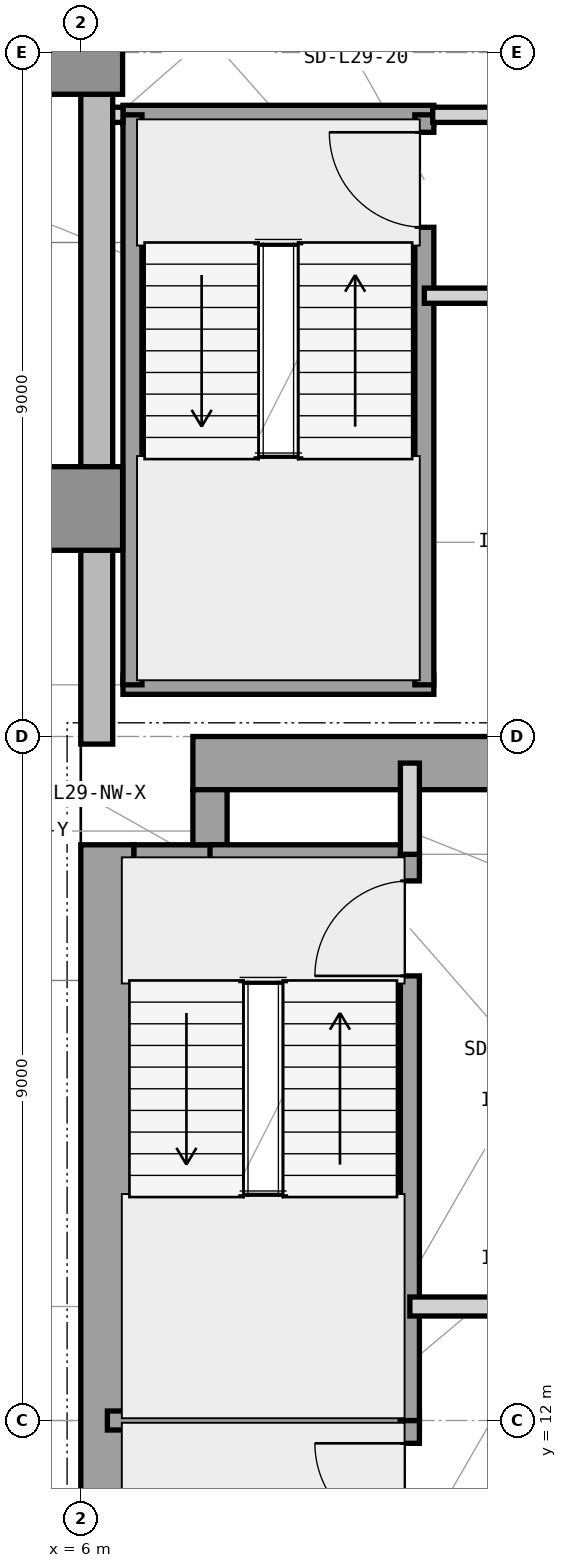
"""IFC4 building model, lengths in metres.
Left out: names, types, materials, properties, quantities, classifications, styles, units other than length and angle.
Written with IfcOpenShell. Run it as: python <this file> out.ifc"""

import sys

from ifc_helpers import new_model, si_unit, direction, frame, frame_2d, origin, origin_2d, place, context, subcontext, project, spatial, rectangle, extrude, element, fill, save


model = new_model("IFC4")
c1 = context("Model", 3, precision=1e-05, world=origin(), true_north=direction((0.0, 1.0)))
c2 = subcontext(c1, "Body", "Model", "MODEL_VIEW")
j1 = project(units=[si_unit("LENGTHUNIT", "METRE"), si_unit("PLANEANGLEUNIT", "RADIAN")], contexts=[c1])
p1 = place(None, origin())
s1 = spatial("IfcSite", under=j1, at=p1, CompositionType="ELEMENT")
p2 = place(p1, origin())
s2 = spatial("IfcBuilding", under=s1, at=p2, CompositionType="ELEMENT")
p3 = place(p2, frame((0.0, 0.0, 124.5)))
s3 = spatial("IfcBuildingStorey", under=s2, at=p3, CompositionType="ELEMENT", Elevation=124.5)
p4 = place(p3, frame((6.35, 4.425, 0.0), z_axis=(0.0, 0.0, 1.0), x_axis=(0.0, 1.0, 0.0)))
e1 = element("IfcWall", 1, at=p4, inside=s3, PredefinedType="SHEAR", context=c2, shape_type="SweptSolid", body=[
    extrude(rectangle(XDim=15.15, YDim=0.7, at=frame_2d((7.575, 0.0))), origin(), (0.0, 0.0, 1.0), 3.9),
])
p5 = place(p3, frame((7.475, 20.65, 0.0), z_axis=(0.0, 0.0, 1.0), x_axis=(1.0, 0.0, 0.0)))
e2 = element("IfcWall", 2, at=p5, inside=s3, PredefinedType="SHEAR", context=c2, shape_type="SweptSolid", body=[
    extrude(rectangle(XDim=12.325, YDim=0.7, at=frame_2d((6.163, 0.0))), origin(), (0.0, 0.0, 1.0), 3.9),
])
p6 = place(p3, frame((6.7, 19.35, 0.0), z_axis=(0.0, 0.0, 1.0), x_axis=(1.0, 0.0, 0.0)))
e3 = element("IfcWall", 3, at=p6, inside=s3, PredefinedType="SHEAR", context=c2, shape_type="SweptSolid", body=[
    extrude(rectangle(XDim=1.225, YDim=0.45, at=frame_2d((0.613, 0.0))), origin(), (0.0, 0.0, 1.0), 3.9),
])
p7 = place(p3, frame((7.7, 19.575, 0.0), z_axis=(0.0, 0.0, 1.0), x_axis=(0.0, 1.0, 0.0)))
e4 = element("IfcWall", 4, at=p7, inside=s3, PredefinedType="SHEAR", context=c2, shape_type="SweptSolid", body=[
    extrude(rectangle(XDim=0.725, YDim=0.45, at=frame_2d((0.363, 0.0))), origin(), (0.0, 0.0, 1.0), 3.9),
])
for number, where, z_axis, x_axis in (
    (5, (6.0, 24.0, 0.0), (0.0, 0.0, 1.0), (1.0, 0.0, 0.0)),
    (6, (6.0, 30.0, 0.0), (0.0, 0.0, 1.0), (1.0, 0.0, 0.0)),
):
    element("IfcColumn", number, at=place(p3, frame(where, z_axis=z_axis, x_axis=x_axis)), inside=s3, PredefinedType="COLUMN", context=c2, shape_type="SweptSolid", body=[
        extrude(rectangle(XDim=1.1, YDim=1.1, at=origin_2d()), origin(), (0.0, 0.0, 1.0), 3.9),
    ])
p8 = place(p3, frame((6.21, 46.4, 0.0), z_axis=(0.0, 0.0, 1.0), x_axis=(0.0, -1.0, 0.0)))
e7 = element("IfcWall", 7, at=p8, inside=s3, PredefinedType="STANDARD", context=c2, shape_type="SweptSolid", body=[
    extrude(rectangle(XDim=25.5, YDim=0.42, at=frame_2d((12.75, 0.0))), origin(), (0.0, 0.0, 1.0), 3.7),
])
p9 = place(p8, frame((11.5, 0.0, 0.85)))
e8 = element("IfcOpeningElement", 8, at=p9, cuts=e7, PredefinedType="OPENING", context=c2, shape_type="SweptSolid", body=[
    extrude(rectangle(XDim=2.5, YDim=2.25, at=frame_2d((1.25, 1.125))), frame((0.0, 0.22, 0.0), z_axis=(0.0, -1.0, 0.0), x_axis=(1.0, 0.0, 0.0)), (0.0, 0.0, 1.0), 0.44),
])
p10 = place(p8, frame((8.286, 0.0, 0.85)))
e9 = element("IfcOpeningElement", 9, at=p10, cuts=e7, PredefinedType="OPENING", context=c2, shape_type="SweptSolid", body=[
    extrude(rectangle(XDim=1.2, YDim=2.25, at=frame_2d((0.6, 1.125))), frame((0.0, 0.22, 0.0), z_axis=(0.0, -1.0, 0.0), x_axis=(1.0, 0.0, 0.0)), (0.0, 0.0, 1.0), 0.44),
])
p11 = place(p3, frame((6.35, 12.0, 0.0), z_axis=(0.0, 0.0, 1.0), x_axis=(1.0, 0.0, 0.0)))
e10 = element("IfcWall", 10, at=p11, inside=s3, PredefinedType="SHEAR", context=c2, shape_type="SweptSolid", body=[
    extrude(rectangle(XDim=4.105, YDim=0.25, at=frame_2d((2.052, 0.0))), origin(), (0.0, 0.0, 1.0), 3.9),
])
p12 = place(p3, frame((7.7, 19.45, 0.0), z_axis=(0.0, 0.0, 1.0), x_axis=(1.0, 0.0, 0.0)))
e11 = element("IfcWall", 11, at=p12, inside=s3, PredefinedType="SHEAR", context=c2, shape_type="SweptSolid", body=[
    extrude(rectangle(XDim=2.755, YDim=0.25, at=frame_2d((1.377, 0.0))), origin(), (0.0, 0.0, 1.0), 3.9),
])
p13 = place(p3, frame((10.33, 4.55, 0.0), z_axis=(0.0, 0.0, 1.0), x_axis=(0.0, 1.0, 0.0)))
e12 = element("IfcWall", 12, at=p13, inside=s3, PredefinedType="SHEAR", context=c2, shape_type="SweptSolid", body=[
    extrude(rectangle(XDim=7.45, YDim=0.25, at=frame_2d((3.725, 0.0))), origin(), (0.0, 0.0, 1.0), 3.9),
])
p14 = place(p13, frame((5.9, 0.0, 0.0)))
e13 = element("IfcOpeningElement", 13, at=p14, cuts=e12, PredefinedType="OPENING", context=c2, shape_type="SweptSolid", body=[
    extrude(rectangle(XDim=1.25, YDim=2.2, at=frame_2d((0.625, 1.1))), frame((0.0, 0.135, 0.0), z_axis=(0.0, -1.0, 0.0), x_axis=(1.0, 0.0, 0.0)), (0.0, 0.0, 1.0), 0.27),
])
p15 = place(p3, frame((10.33, 12.0, 0.0), z_axis=(0.0, 0.0, 1.0), x_axis=(0.0, 1.0, 0.0)))
e14 = element("IfcWall", 14, at=p15, inside=s3, PredefinedType="SHEAR", context=c2, shape_type="SweptSolid", body=[
    extrude(rectangle(XDim=7.45, YDim=0.25, at=frame_2d((3.725, 0.0))), origin(), (0.0, 0.0, 1.0), 3.9),
])
p16 = place(p15, frame((5.85, 0.0, 0.0)))
e15 = element("IfcOpeningElement", 15, at=p16, cuts=e14, PredefinedType="OPENING", context=c2, shape_type="SweptSolid", body=[
    extrude(rectangle(XDim=1.25, YDim=2.2, at=frame_2d((0.625, 1.1))), frame((0.0, 0.135, 0.0), z_axis=(0.0, -1.0, 0.0), x_axis=(1.0, 0.0, 0.0)), (0.0, 0.0, 1.0), 0.27),
])
p17 = place(p3, frame((10.33, 19.45, 0.0), z_axis=(0.0, 0.0, 1.0), x_axis=(0.0, 1.0, 0.0)))
e16 = element("IfcWall", 16, at=p17, inside=s3, PredefinedType="PARTITIONING", context=c2, shape_type="SweptSolid", body=[
    extrude(rectangle(XDim=1.2, YDim=0.25, at=frame_2d((0.6, 0.0))), origin(), (0.0, 0.0, 1.0), 2.994),
])
p18 = place(p3, frame((10.33, 13.5, 0.0), z_axis=(0.0, 0.0, 1.0), x_axis=(1.0, 0.0, 0.0)))
e17 = element("IfcWall", 17, at=p18, inside=s3, PredefinedType="PARTITIONING", context=c2, shape_type="SweptSolid", body=[
    extrude(rectangle(XDim=1.62, YDim=0.25, at=frame_2d((0.81, 0.0))), origin(), (0.0, 0.0, 1.0), 3.233),
])
for number, where, z_axis, x_axis in (
    (18, (6.555, 21.68, 0.0), (0.0, 0.0, 1.0), (1.0, 0.0, 0.0)),
    (19, (6.555, 29.18, 0.0), (0.0, 0.0, 1.0), (1.0, 0.0, 0.0)),
):
    element("IfcWall", number, at=place(p3, frame(where, z_axis=z_axis, x_axis=x_axis)), inside=s3, PredefinedType="SHEAR", context=c2, shape_type="SweptSolid", body=[
        extrude(rectangle(XDim=4.09, YDim=0.25, at=frame_2d((2.045, 0.0))), origin(), (0.0, 0.0, 1.0), 3.9),
    ])
p19 = place(p3, frame((6.68, 21.68, 0.0), z_axis=(0.0, 0.0, 1.0), x_axis=(0.0, 1.0, 0.0)))
e20 = element("IfcWall", 20, at=p19, inside=s3, PredefinedType="SHEAR", context=c2, shape_type="SweptSolid", body=[
    extrude(rectangle(XDim=7.5, YDim=0.25, at=frame_2d((3.75, 0.0))), origin(), (0.0, 0.0, 1.0), 3.9),
])
p20 = place(p3, frame((10.52, 21.68, 0.0), z_axis=(0.0, 0.0, 1.0), x_axis=(0.0, 1.0, 0.0)))
e21 = element("IfcWall", 21, at=p20, inside=s3, PredefinedType="SHEAR", context=c2, shape_type="SweptSolid", body=[
    extrude(rectangle(XDim=7.5, YDim=0.25, at=frame_2d((3.75, 0.0))), origin(), (0.0, 0.0, 1.0), 3.9),
])
p21 = place(p20, frame((6.02, 0.0, 0.0)))
e22 = element("IfcOpeningElement", 22, at=p21, cuts=e21, PredefinedType="OPENING", context=c2, shape_type="SweptSolid", body=[
    extrude(rectangle(XDim=1.25, YDim=2.2, at=frame_2d((0.625, 1.1))), frame((0.0, 0.135, 0.0), z_axis=(0.0, -1.0, 0.0), x_axis=(1.0, 0.0, 0.0)), (0.0, 0.0, 1.0), 0.27),
])
p22 = place(p3, frame((10.52, 26.8, 0.0), z_axis=(0.0, 0.0, 1.0), x_axis=(1.0, 0.0, 0.0)))
e23 = element("IfcWall", 23, at=p22, inside=s3, PredefinedType="PARTITIONING", context=c2, shape_type="SweptSolid", body=[
    extrude(rectangle(XDim=9.28, YDim=0.2, at=frame_2d((4.64, 0.0))), origin(), (0.0, 0.0, 1.0), 3.69),
])
p23 = place(p22, frame((4.0, 0.0, 0.0)))
e24 = element("IfcOpeningElement", 24, at=p23, cuts=e23, PredefinedType="OPENING", context=c2, shape_type="SweptSolid", body=[
    extrude(rectangle(XDim=1.0, YDim=2.15, at=frame_2d((0.5, 1.075))), frame((0.0, 0.11, 0.0), z_axis=(0.0, -1.0, 0.0), x_axis=(1.0, 0.0, 0.0)), (0.0, 0.0, 1.0), 0.22),
])
p24 = place(p3, frame((6.42, 29.18, 0.0), z_axis=(0.0, 0.0, 1.0), x_axis=(1.0, 0.0, 0.0)))
e25 = element("IfcWall", 25, at=p24, inside=s3, PredefinedType="PARTITIONING", context=c2, shape_type="SweptSolid", body=[
    extrude(rectangle(XDim=0.135, YDim=0.2, at=frame_2d((0.067, 0.0))), origin(), (0.0, 0.0, 1.0), 3.69),
])
p25 = place(p3, frame((10.63, 29.18, 0.0), z_axis=(0.0, 0.0, 1.0), x_axis=(1.0, 0.0, 0.0)))
e26 = element("IfcWall", 26, at=p25, inside=s3, PredefinedType="PARTITIONING", context=c2, shape_type="SweptSolid", body=[
    extrude(rectangle(XDim=10.17, YDim=0.2, at=frame_2d((5.085, 0.0))), origin(), (0.0, 0.0, 1.0), 3.69),
])
p26 = place(p14, origin())
e27 = element("IfcDoor", 27, at=p26, inside=s3, OperationType="SINGLE_SWING_RIGHT", PredefinedType="DOOR", context=c2, shape_type="SweptSolid", body=[
    extrude(rectangle(XDim=1.25, YDim=2.2, at=frame_2d((0.625, 1.1))), frame((0.0, 0.025, 0.0), z_axis=(0.0, -1.0, 0.0), x_axis=(1.0, 0.0, 0.0)), (0.0, 0.0, 1.0), 0.05),
])
fill(e13, e27)
p27 = place(p16, origin())
e28 = element("IfcDoor", 28, at=p27, inside=s3, OperationType="SINGLE_SWING_LEFT", PredefinedType="DOOR", context=c2, shape_type="SweptSolid", body=[
    extrude(rectangle(XDim=1.25, YDim=2.2, at=frame_2d((0.625, 1.1))), frame((0.0, 0.025, 0.0), z_axis=(0.0, -1.0, 0.0), x_axis=(1.0, 0.0, 0.0)), (0.0, 0.0, 1.0), 0.05),
])
fill(e15, e28)
p28 = place(p21, origin())
e29 = element("IfcDoor", 29, at=p28, inside=s3, OperationType="SINGLE_SWING_RIGHT", PredefinedType="DOOR", context=c2, shape_type="SweptSolid", body=[
    extrude(rectangle(XDim=1.25, YDim=2.2, at=frame_2d((0.625, 1.1))), frame((0.0, 0.025, 0.0), z_axis=(0.0, -1.0, 0.0), x_axis=(1.0, 0.0, 0.0)), (0.0, 0.0, 1.0), 0.05),
])
fill(e22, e29)
save(model, sys.argv[1])
